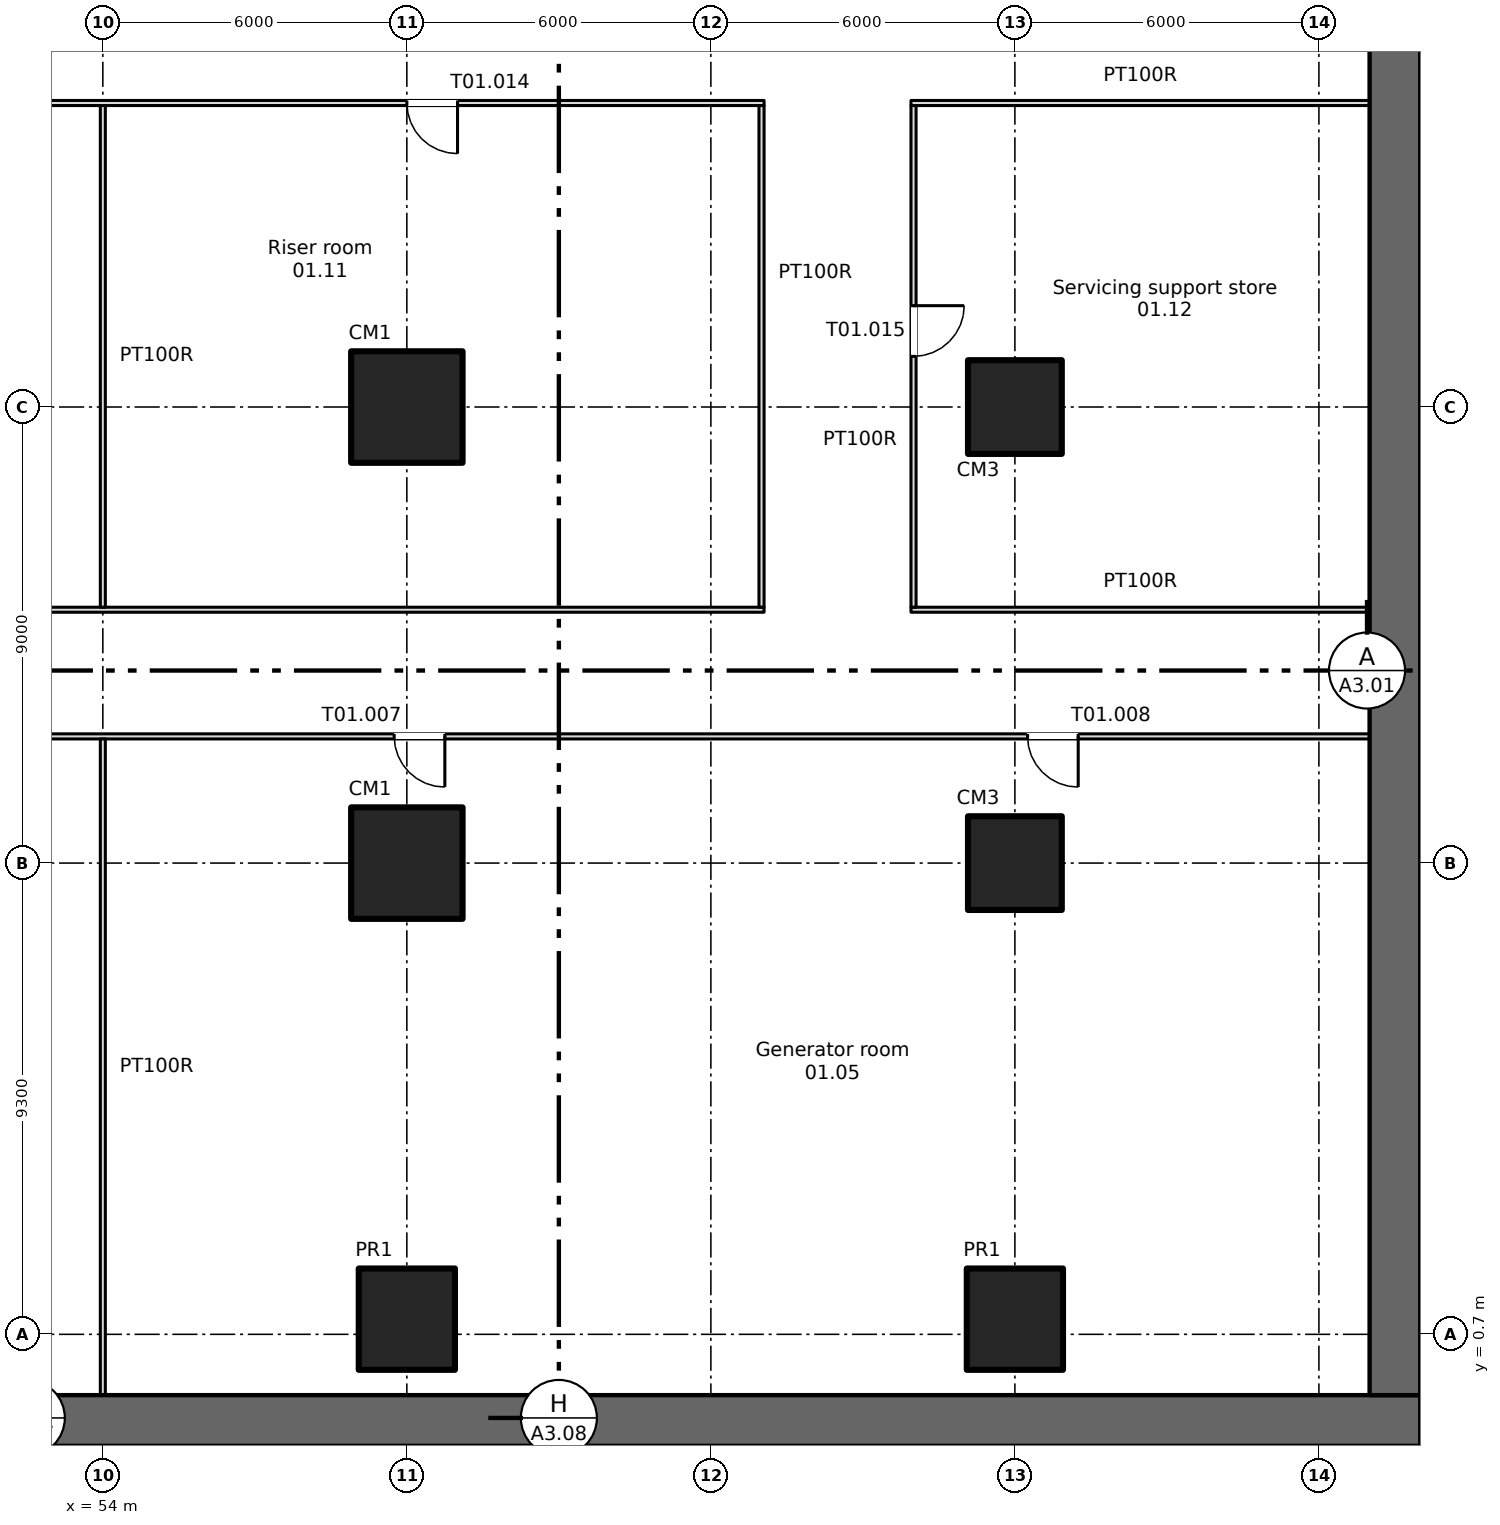
"""IFC4 building model, lengths in metres.
Left out: names, types, materials, properties, quantities, classifications, styles, units other than length and angle.
Written with IfcOpenShell. Run it as: python <this file> out.ifc"""

import sys

from ifc_helpers import new_model, si_unit, direction, frame, frame_2d, origin, origin_2d, place, context, subcontext, project, spatial, rectangle, extrude, element, fill, save


model = new_model("IFC4")
c1 = context("Model", 3, precision=1e-05, world=origin(), true_north=direction((0.0, 1.0)))
c2 = subcontext(c1, "Body", "Model", "MODEL_VIEW")
j1 = project(units=[si_unit("LENGTHUNIT", "METRE"), si_unit("PLANEANGLEUNIT", "RADIAN")], contexts=[c1])
p1 = place(None, origin())
s1 = spatial("IfcSite", under=j1, at=p1, CompositionType="ELEMENT")
p2 = place(p1, origin())
s2 = spatial("IfcBuilding", under=s1, at=p2, CompositionType="ELEMENT")
p3 = place(p2, frame((0.0, 0.0, -12.0)))
s3 = spatial("IfcBuildingStorey", under=s2, at=p3, CompositionType="ELEMENT", Elevation=-12.0)
p4 = place(p3, frame((-2.0, -1.0, 0.0), z_axis=(0.0, 0.0, 1.0), x_axis=(1.0, 0.0, 0.0)))
e1 = element("IfcWall", 1, at=p4, inside=s3, PredefinedType="SOLIDWALL", context=c2, shape_type="SweptSolid", body=[
    extrude(rectangle(XDim=82.0, YDim=1.0, at=frame_2d((41.0, 0.0))), origin(), (0.0, 0.0, 1.0), 5.55),
])
p5 = place(p3, frame((79.5, -0.5, 0.0), z_axis=(0.0, 0.0, 1.0), x_axis=(0.0, 1.0, 0.0)))
e2 = element("IfcWall", 2, at=p5, inside=s3, PredefinedType="SOLIDWALL", context=c2, shape_type="SweptSolid", body=[
    extrude(rectangle(XDim=46.0, YDim=1.0, at=frame_2d((23.0, 0.0))), origin(), (0.0, 0.0, 1.0), 5.55),
])
for number, where, z_axis, x_axis in (
    (3, (60.0, 1.0, 0.0), (0.0, 0.0, 1.0), (1.0, 0.0, 0.0)),
    (4, (72.0, 1.0, 0.0), (0.0, 0.0, 1.0), (1.0, 0.0, 0.0)),
):
    element("IfcColumn", number, at=place(p3, frame(where, z_axis=z_axis, x_axis=x_axis)), inside=s3, PredefinedType="COLUMN", context=c2, shape_type="SweptSolid", body=[
        extrude(rectangle(XDim=1.9, YDim=2.0, at=origin_2d()), origin(), (0.0, 0.0, 1.0), 5.55),
    ])
for number, where, z_axis, x_axis in (
    (5, (60.0, 10.0, 0.0), (0.0, 0.0, 1.0), (1.0, 0.0, 0.0)),
    (6, (60.0, 19.0, 0.0), (0.0, 0.0, 1.0), (1.0, 0.0, 0.0)),
):
    element("IfcColumn", number, at=place(p3, frame(where, z_axis=z_axis, x_axis=x_axis)), inside=s3, PredefinedType="COLUMN", context=c2, shape_type="SweptSolid", body=[
        extrude(rectangle(XDim=2.2, YDim=2.2, at=origin_2d()), origin(), (0.0, 0.0, 1.0), 5.55),
    ])
for number, where, z_axis, x_axis in (
    (7, (72.0, 10.0, 0.0), (0.0, 0.0, 1.0), (1.0, 0.0, 0.0)),
    (8, (72.0, 19.0, 0.0), (0.0, 0.0, 1.0), (1.0, 0.0, 0.0)),
):
    element("IfcColumn", number, at=place(p3, frame(where, z_axis=z_axis, x_axis=x_axis)), inside=s3, PredefinedType="COLUMN", context=c2, shape_type="SweptSolid", body=[
        extrude(rectangle(XDim=1.85, YDim=1.85, at=origin_2d()), origin(), (0.0, 0.0, 1.0), 5.55),
    ])
p6 = place(p3, frame((-1.0, 12.5, 0.0), z_axis=(0.0, 0.0, 1.0), x_axis=(1.0, 0.0, 0.0)))
e9 = element("IfcWall", 9, at=p6, inside=s3, PredefinedType="PARTITIONING", context=c2, shape_type="SweptSolid", body=[
    extrude(rectangle(XDim=80.0, YDim=0.1, at=frame_2d((40.0, 0.0))), origin(), (0.0, 0.0, 1.0), 5.55),
])
p7 = place(p6, frame((4.25, 0.0, 0.0)))
e10 = element("IfcOpeningElement", 10, at=p7, cuts=e9, PredefinedType="OPENING", context=c2, shape_type="SweptSolid", body=[
    extrude(rectangle(XDim=1.0, YDim=2.1, at=frame_2d((0.5, 1.05))), frame((0.0, 0.06, 0.0), z_axis=(0.0, -1.0, 0.0), x_axis=(1.0, 0.0, 0.0)), (0.0, 0.0, 1.0), 0.12),
])
p8 = place(p6, frame((13.75, 0.0, 0.0)))
e11 = element("IfcOpeningElement", 11, at=p8, cuts=e9, PredefinedType="OPENING", context=c2, shape_type="SweptSolid", body=[
    extrude(rectangle(XDim=1.0, YDim=2.1, at=frame_2d((0.5, 1.05))), frame((0.0, 0.06, 0.0), z_axis=(0.0, -1.0, 0.0), x_axis=(1.0, 0.0, 0.0)), (0.0, 0.0, 1.0), 0.12),
])
p9 = place(p6, frame((21.5, 0.0, 0.0)))
e12 = element("IfcOpeningElement", 12, at=p9, cuts=e9, PredefinedType="OPENING", context=c2, shape_type="SweptSolid", body=[
    extrude(rectangle(XDim=1.0, YDim=2.1, at=frame_2d((0.5, 1.05))), frame((0.0, 0.06, 0.0), z_axis=(0.0, -1.0, 0.0), x_axis=(1.0, 0.0, 0.0)), (0.0, 0.0, 1.0), 0.12),
])
p10 = place(p6, frame((27.5, 0.0, 0.0)))
e13 = element("IfcOpeningElement", 13, at=p10, cuts=e9, PredefinedType="OPENING", context=c2, shape_type="SweptSolid", body=[
    extrude(rectangle(XDim=1.0, YDim=2.1, at=frame_2d((0.5, 1.05))), frame((0.0, 0.06, 0.0), z_axis=(0.0, -1.0, 0.0), x_axis=(1.0, 0.0, 0.0)), (0.0, 0.0, 1.0), 0.12),
])
p11 = place(p6, frame((36.5, 0.0, 0.0)))
e14 = element("IfcOpeningElement", 14, at=p11, cuts=e9, PredefinedType="OPENING", context=c2, shape_type="SweptSolid", body=[
    extrude(rectangle(XDim=1.0, YDim=2.1, at=frame_2d((0.5, 1.05))), frame((0.0, 0.06, 0.0), z_axis=(0.0, -1.0, 0.0), x_axis=(1.0, 0.0, 0.0)), (0.0, 0.0, 1.0), 0.12),
])
p12 = place(p6, frame((48.5, 0.0, 0.0)))
e15 = element("IfcOpeningElement", 15, at=p12, cuts=e9, PredefinedType="OPENING", context=c2, shape_type="SweptSolid", body=[
    extrude(rectangle(XDim=1.0, YDim=2.1, at=frame_2d((0.5, 1.05))), frame((0.0, 0.06, 0.0), z_axis=(0.0, -1.0, 0.0), x_axis=(1.0, 0.0, 0.0)), (0.0, 0.0, 1.0), 0.12),
])
p13 = place(p6, frame((60.75, 0.0, 0.0)))
e16 = element("IfcOpeningElement", 16, at=p13, cuts=e9, PredefinedType="OPENING", context=c2, shape_type="SweptSolid", body=[
    extrude(rectangle(XDim=1.0, YDim=2.1, at=frame_2d((0.5, 1.05))), frame((0.0, 0.06, 0.0), z_axis=(0.0, -1.0, 0.0), x_axis=(1.0, 0.0, 0.0)), (0.0, 0.0, 1.0), 0.12),
])
p14 = place(p6, frame((73.25, 0.0, 0.0)))
e17 = element("IfcOpeningElement", 17, at=p14, cuts=e9, PredefinedType="OPENING", context=c2, shape_type="SweptSolid", body=[
    extrude(rectangle(XDim=1.0, YDim=2.1, at=frame_2d((0.5, 1.05))), frame((0.0, 0.06, 0.0), z_axis=(0.0, -1.0, 0.0), x_axis=(1.0, 0.0, 0.0)), (0.0, 0.0, 1.0), 0.12),
])
p15 = place(p3, frame((10.95, 15.0, 0.0), z_axis=(0.0, 0.0, 1.0), x_axis=(1.0, 0.0, 0.0)))
e18 = element("IfcWall", 18, at=p15, inside=s3, PredefinedType="PARTITIONING", context=c2, shape_type="SweptSolid", body=[
    extrude(rectangle(XDim=56.1, YDim=0.1, at=frame_2d((28.05, 0.0))), origin(), (0.0, 0.0, 1.0), 5.55),
])
p16 = place(p3, frame((69.95, 15.0, 0.0), z_axis=(0.0, 0.0, 1.0), x_axis=(1.0, 0.0, 0.0)))
e19 = element("IfcWall", 19, at=p16, inside=s3, PredefinedType="PARTITIONING", context=c2, shape_type="SweptSolid", body=[
    extrude(rectangle(XDim=9.05, YDim=0.1, at=frame_2d((4.525, 0.0))), origin(), (0.0, 0.0, 1.0), 5.55),
])
p17 = place(p3, frame((10.95, 25.0, 0.0), z_axis=(0.0, 0.0, 1.0), x_axis=(1.0, 0.0, 0.0)))
e20 = element("IfcWall", 20, at=p17, inside=s3, PredefinedType="PARTITIONING", context=c2, shape_type="SweptSolid", body=[
    extrude(rectangle(XDim=56.1, YDim=0.1, at=frame_2d((28.05, 0.0))), origin(), (0.0, 0.0, 1.0), 5.55),
])
p18 = place(p17, frame((12.55, 0.0, 0.0)))
e21 = element("IfcOpeningElement", 21, at=p18, cuts=e20, PredefinedType="OPENING", context=c2, shape_type="SweptSolid", body=[
    extrude(rectangle(XDim=1.0, YDim=2.1, at=frame_2d((0.5, 1.05))), frame((0.0, 0.06, 0.0), z_axis=(0.0, -1.0, 0.0), x_axis=(1.0, 0.0, 0.0)), (0.0, 0.0, 1.0), 0.12),
])
p19 = place(p17, frame((24.55, 0.0, 0.0)))
e22 = element("IfcOpeningElement", 22, at=p19, cuts=e20, PredefinedType="OPENING", context=c2, shape_type="SweptSolid", body=[
    extrude(rectangle(XDim=1.0, YDim=2.1, at=frame_2d((0.5, 1.05))), frame((0.0, 0.06, 0.0), z_axis=(0.0, -1.0, 0.0), x_axis=(1.0, 0.0, 0.0)), (0.0, 0.0, 1.0), 0.12),
])
p20 = place(p17, frame((36.55, 0.0, 0.0)))
e23 = element("IfcOpeningElement", 23, at=p20, cuts=e20, PredefinedType="OPENING", context=c2, shape_type="SweptSolid", body=[
    extrude(rectangle(XDim=1.0, YDim=2.1, at=frame_2d((0.5, 1.05))), frame((0.0, 0.06, 0.0), z_axis=(0.0, -1.0, 0.0), x_axis=(1.0, 0.0, 0.0)), (0.0, 0.0, 1.0), 0.12),
])
p21 = place(p17, frame((49.05, 0.0, 0.0)))
e24 = element("IfcOpeningElement", 24, at=p21, cuts=e20, PredefinedType="OPENING", context=c2, shape_type="SweptSolid", body=[
    extrude(rectangle(XDim=1.0, YDim=2.1, at=frame_2d((0.5, 1.05))), frame((0.0, 0.06, 0.0), z_axis=(0.0, -1.0, 0.0), x_axis=(1.0, 0.0, 0.0)), (0.0, 0.0, 1.0), 0.12),
])
p22 = place(p3, frame((69.95, 25.0, 0.0), z_axis=(0.0, 0.0, 1.0), x_axis=(1.0, 0.0, 0.0)))
e25 = element("IfcWall", 25, at=p22, inside=s3, PredefinedType="PARTITIONING", context=c2, shape_type="SweptSolid", body=[
    extrude(rectangle(XDim=9.05, YDim=0.1, at=frame_2d((4.525, 0.0))), origin(), (0.0, 0.0, 1.0), 5.55),
])
p23 = place(p3, frame((54.0, -0.5, 0.0), z_axis=(0.0, 0.0, 1.0), x_axis=(0.0, 1.0, 0.0)))
e26 = element("IfcWall", 26, at=p23, inside=s3, PredefinedType="PARTITIONING", context=c2, shape_type="SweptSolid", body=[
    extrude(rectangle(XDim=12.95, YDim=0.1, at=frame_2d((6.475, 0.0))), origin(), (0.0, 0.0, 1.0), 5.55),
])
for number, where, z_axis, x_axis in (
    (27, (54.0, 15.05, 0.0), (0.0, 0.0, 1.0), (0.0, 1.0, 0.0)),
    (28, (67.0, 15.05, 0.0), (0.0, 0.0, 1.0), (0.0, 1.0, 0.0)),
):
    element("IfcWall", number, at=place(p3, frame(where, z_axis=z_axis, x_axis=x_axis)), inside=s3, PredefinedType="PARTITIONING", context=c2, shape_type="SweptSolid", body=[
        extrude(rectangle(XDim=9.9, YDim=0.1, at=frame_2d((4.95, 0.0))), origin(), (0.0, 0.0, 1.0), 5.55),
    ])
p24 = place(p3, frame((70.0, 15.05, 0.0), z_axis=(0.0, 0.0, 1.0), x_axis=(0.0, 1.0, 0.0)))
e29 = element("IfcWall", 29, at=p24, inside=s3, PredefinedType="PARTITIONING", context=c2, shape_type="SweptSolid", body=[
    extrude(rectangle(XDim=9.9, YDim=0.1, at=frame_2d((4.95, 0.0))), origin(), (0.0, 0.0, 1.0), 5.55),
])
p25 = place(p24, frame((4.95, 0.0, 0.0)))
e30 = element("IfcOpeningElement", 30, at=p25, cuts=e29, PredefinedType="OPENING", context=c2, shape_type="SweptSolid", body=[
    extrude(rectangle(XDim=1.0, YDim=2.1, at=frame_2d((0.5, 1.05))), frame((0.0, 0.06, 0.0), z_axis=(0.0, -1.0, 0.0), x_axis=(1.0, 0.0, 0.0)), (0.0, 0.0, 1.0), 0.12),
])
p26 = place(p13, origin())
e31 = element("IfcDoor", 31, at=p26, inside=s3, OperationType="SINGLE_SWING_RIGHT", PredefinedType="DOOR", context=c2, shape_type="SweptSolid", body=[
    extrude(rectangle(XDim=1.0, YDim=2.1, at=frame_2d((0.5, 1.05))), frame((0.0, 0.025, 0.0), z_axis=(0.0, -1.0, 0.0), x_axis=(1.0, 0.0, 0.0)), (0.0, 0.0, 1.0), 0.05),
])
fill(e16, e31)
p27 = place(p14, origin())
e32 = element("IfcDoor", 32, at=p27, inside=s3, OperationType="SINGLE_SWING_RIGHT", PredefinedType="DOOR", context=c2, shape_type="SweptSolid", body=[
    extrude(rectangle(XDim=1.0, YDim=2.1, at=frame_2d((0.5, 1.05))), frame((0.0, 0.025, 0.0), z_axis=(0.0, -1.0, 0.0), x_axis=(1.0, 0.0, 0.0)), (0.0, 0.0, 1.0), 0.05),
])
fill(e17, e32)
p28 = place(p21, origin())
e33 = element("IfcDoor", 33, at=p28, inside=s3, OperationType="SINGLE_SWING_RIGHT", PredefinedType="DOOR", context=c2, shape_type="SweptSolid", body=[
    extrude(rectangle(XDim=1.0, YDim=2.1, at=frame_2d((0.5, 1.05))), frame((0.0, 0.025, 0.0), z_axis=(0.0, -1.0, 0.0), x_axis=(1.0, 0.0, 0.0)), (0.0, 0.0, 1.0), 0.05),
])
fill(e24, e33)
p29 = place(p25, origin())
e34 = element("IfcDoor", 34, at=p29, inside=s3, OperationType="SINGLE_SWING_RIGHT", PredefinedType="DOOR", context=c2, shape_type="SweptSolid", body=[
    extrude(rectangle(XDim=1.0, YDim=2.1, at=frame_2d((0.5, 1.05))), frame((0.0, 0.025, 0.0), z_axis=(0.0, -1.0, 0.0), x_axis=(1.0, 0.0, 0.0)), (0.0, 0.0, 1.0), 0.05),
])
fill(e30, e34)
save(model, sys.argv[1])
